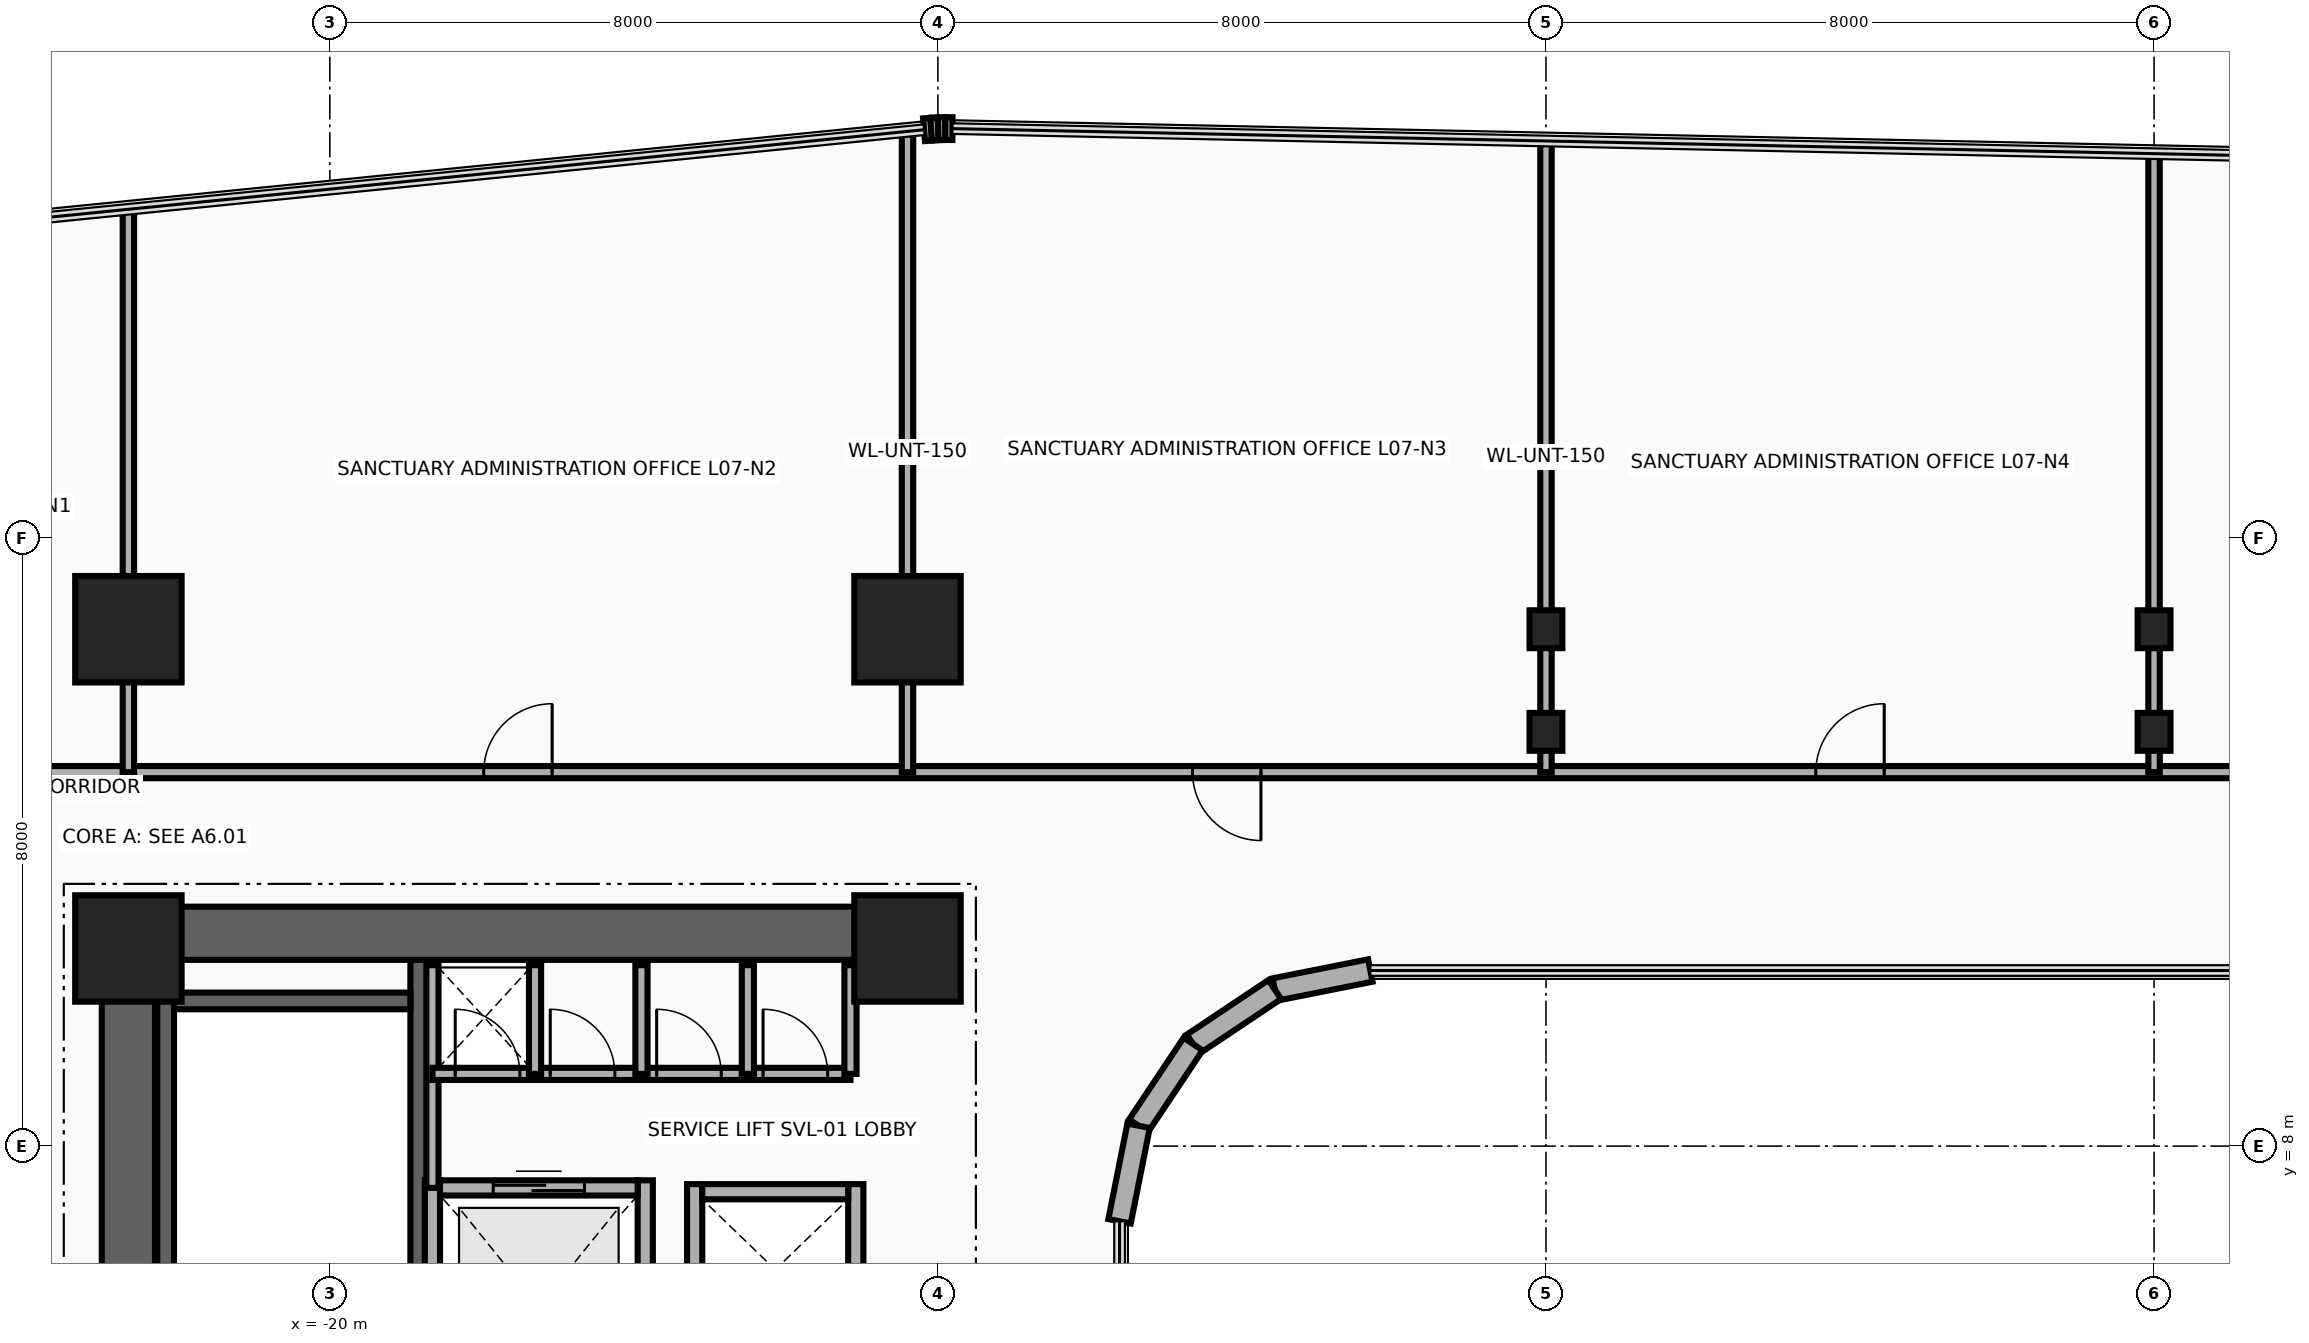
"""IFC4 building model, lengths in metres.
Left out: names, types, materials, properties, quantities, classifications, styles, units other than length and angle.
Written with IfcOpenShell. Run it as: python <this file> out.ifc"""

import sys

from ifc_helpers import new_model, si_unit, direction, frame, frame_2d, origin, origin_2d, place, context, subcontext, project, spatial, rectangle, i_section, extrude, source, transform, mapped, element, fill, save


model = new_model("IFC4")
c1 = context("Model", 3, precision=1e-05, world=origin(), true_north=direction((0.0, 1.0)))
c2 = subcontext(c1, "Body", "Model", "MODEL_VIEW")
j1 = project(units=[si_unit("LENGTHUNIT", "METRE"), si_unit("PLANEANGLEUNIT", "RADIAN")], contexts=[c1])
p1 = place(None, origin())
s1 = spatial("IfcSite", under=j1, at=p1, CompositionType="ELEMENT")
p2 = place(p1, origin())
s2 = spatial("IfcBuilding", under=s1, at=p2, CompositionType="ELEMENT")
p3 = place(p2, frame((0.0, 0.0, 33.4)))
s3 = spatial("IfcBuildingStorey", under=s2, at=p3, CompositionType="ELEMENT", Elevation=33.4)
for number, where, z_axis, x_axis in (
    (1, (-22.16, 1.78, 0.0), (0.0, 0.0, 1.0), (0.0, 1.0, 0.0)),
    (2, (-18.83, 1.78, 0.0), (0.0, 0.0, 1.0), (0.0, 1.0, 0.0)),
):
    element("IfcWall", number, at=place(p3, frame(where, z_axis=z_axis, x_axis=x_axis)), inside=s3, PredefinedType="SHEAR", context=c2, shape_type="SweptSolid", body=[
        extrude(rectangle(XDim=8.67, YDim=0.22, at=frame_2d((4.335, 0.0))), origin(), (0.0, 0.0, 1.0), 3.46),
    ])
p4 = place(p3, frame((-22.05, 9.91, 0.0), z_axis=(0.0, 0.0, 1.0), x_axis=(1.0, 0.0, 0.0)))
e3 = element("IfcWall", 3, at=p4, inside=s3, PredefinedType="SHEAR", context=c2, shape_type="SweptSolid", body=[
    extrude(rectangle(XDim=3.11, YDim=0.22, at=frame_2d((1.555, 0.0))), origin(), (0.0, 0.0, 1.0), 3.46),
])
p5 = place(p3, frame((-22.65, -11.15, 0.0), z_axis=(0.0, 0.0, 1.0), x_axis=(0.0, 1.0, 0.0)))
e4 = element("IfcWall", 4, at=p5, inside=s3, PredefinedType="SHEAR", context=c2, shape_type="SweptSolid", body=[
    extrude(rectangle(XDim=22.3, YDim=0.7, at=frame_2d((11.15, 0.0))), origin(), (0.0, 0.0, 1.0), 3.46),
])
p6 = place(p3, frame((-22.65, 10.8, 0.0), z_axis=(0.0, 0.0, 1.0), x_axis=(1.0, 0.0, 0.0)))
e5 = element("IfcWall", 5, at=p6, inside=s3, PredefinedType="SHEAR", context=c2, shape_type="SweptSolid", body=[
    extrude(rectangle(XDim=10.25, YDim=0.7, at=frame_2d((5.125, 0.0))), origin(), (0.0, 0.0, 1.0), 3.46),
])
m1 = source(origin(), c2, "Body", "SweptSolid", [
    extrude(rectangle(XDim=1.4, YDim=1.4, at=origin_2d()), origin(), (0.0, 0.0, 1.0), 3.7),
])
for number, where, z_axis, x_axis in (
    (6, (-22.65, 10.6, 0.0), (0.0, 0.0, 1.0), (1.0, 0.0, 0.0)),
    (7, (-12.4, 10.6, 0.0), (0.0, 0.0, 1.0), (1.0, 0.0, 0.0)),
    (8, (-22.65, 14.8, 0.0), (0.0, 0.0, 1.0), (1.0, 0.0, 0.0)),
    (9, (-12.4, 14.8, 0.0), (0.0, 0.0, 1.0), (1.0, 0.0, 0.0)),
):
    element("IfcColumn", number, at=place(p3, frame(where, z_axis=z_axis, x_axis=x_axis)), inside=s3, PredefinedType="COLUMN", context=c2, shape_type="MappedRepresentation", body=[
        mapped(m1, transform((0.0, 0.0, 0.0), x_axis=(1.0, 0.0, 0.0), y_axis=(0.0, 1.0, 0.0), z_axis=(0.0, 0.0, 1.0), scale=1.0)),
    ])
m2 = source(origin(), c2, "Body", "SweptSolid", [
    extrude(i_section(OverallWidth=0.432, OverallDepth=0.498, WebThickness=0.056, FlangeThickness=0.089, at=origin_2d()), origin(), (0.0, 0.0, 1.0), 3.7),
])
for number, where, z_axis, x_axis in (
    (10, (-4.0, 13.45, 0.0), (0.0, 0.0, 1.0), (1.0, 0.0, 0.0)),
    (11, (-4.0, 14.8, 0.0), (0.0, 0.0, 1.0), (1.0, 0.0, 0.0)),
    (12, (4.0, 13.45, 0.0), (0.0, 0.0, 1.0), (1.0, 0.0, 0.0)),
    (13, (4.0, 14.8, 0.0), (0.0, 0.0, 1.0), (1.0, 0.0, 0.0)),
):
    element("IfcColumn", number, at=place(p3, frame(where, z_axis=z_axis, x_axis=x_axis)), inside=s3, PredefinedType="COLUMN", context=c2, shape_type="MappedRepresentation", body=[
        mapped(m2, transform((0.0, 0.0, 0.0), x_axis=(1.0, 0.0, 0.0), y_axis=(0.0, 1.0, 0.0), z_axis=(0.0, 0.0, 1.0), scale=1.0)),
    ])
p7 = place(p3, frame((-12.182, 21.371, 0.0), z_axis=(0.0, 0.0, 1.0), x_axis=(0.996527790842, 0.08326080759, 0.0)))
e14 = element("IfcWall", 14, at=p7, inside=s3, PredefinedType="SOLIDWALL", context=c2, shape_type="SweptSolid", body=[
    extrude(rectangle(XDim=0.094, YDim=0.3, at=frame_2d((0.047, 0.0))), origin(), (0.0, 0.0, 1.0), 3.46),
])
p8 = place(p3, frame((-12.088, 21.379, 0.0), z_axis=(0.0, 0.0, 1.0), x_axis=(0.998476480444, 0.055178963393, 0.0)))
e15 = element("IfcWall", 15, at=p8, inside=s3, PredefinedType="SOLIDWALL", context=c2, shape_type="SweptSolid", body=[
    extrude(rectangle(XDim=0.093, YDim=0.3, at=frame_2d((0.046, 0.0))), origin(), (0.0, 0.0, 1.0), 3.46),
])
p9 = place(p3, frame((-11.996, 21.384, 0.0), z_axis=(0.0, 0.0, 1.0), x_axis=(0.999722573757, 0.023553673204, 0.0)))
e16 = element("IfcWall", 16, at=p9, inside=s3, PredefinedType="SOLIDWALL", context=c2, shape_type="SweptSolid", body=[
    extrude(rectangle(XDim=0.093, YDim=0.3, at=frame_2d((0.047, 0.0))), origin(), (0.0, 0.0, 1.0), 3.46),
])
p10 = place(p3, frame((-11.902, 21.386, 0.0), z_axis=(0.0, 0.0, 1.0), x_axis=(0.999986507273, -0.005194735103, 0.0)))
e17 = element("IfcWall", 17, at=p10, inside=s3, PredefinedType="SOLIDWALL", context=c2, shape_type="SweptSolid", body=[
    extrude(rectangle(XDim=0.094, YDim=0.3, at=frame_2d((0.047, 0.0))), origin(), (0.0, 0.0, 1.0), 3.46),
])
p11 = place(p3, frame((-6.311, 10.31, 0.0), z_axis=(0.0, 0.0, 1.0), x_axis=(-0.980778058848, -0.195126623715, 0.0)))
e18 = element("IfcWall", 18, at=p11, inside=s3, PredefinedType="SOLIDWALL", context=c2, shape_type="SweptSolid", body=[
    extrude(rectangle(XDim=1.281, YDim=0.3, at=frame_2d((0.641, 0.0))), origin(), (0.0, 0.0, 1.0), 3.46),
])
p12 = place(p3, frame((-7.567, 10.06, 0.0), z_axis=(0.0, 0.0, 1.0), x_axis=(-0.831497739511, -0.555528135371, 0.0)))
e19 = element("IfcWall", 19, at=p12, inside=s3, PredefinedType="SOLIDWALL", context=c2, shape_type="SweptSolid", body=[
    extrude(rectangle(XDim=1.292, YDim=0.3, at=frame_2d((0.646, 0.0))), origin(), (0.0, 0.0, 1.0), 3.46),
])
p13 = place(p3, frame((-8.642, 9.342, 0.0), z_axis=(0.0, 0.0, 1.0), x_axis=(-0.555615398575, -0.831439431869, 0.0)))
e20 = element("IfcWall", 20, at=p13, inside=s3, PredefinedType="SOLIDWALL", context=c2, shape_type="SweptSolid", body=[
    extrude(rectangle(XDim=1.292, YDim=0.3, at=frame_2d((0.646, 0.0))), origin(), (0.0, 0.0, 1.0), 3.46),
])
p14 = place(p3, frame((-9.36, 8.268, 0.0), z_axis=(0.0, 0.0, 1.0), x_axis=(-0.195090163074, -0.980785312019, 0.0)))
e21 = element("IfcWall", 21, at=p14, inside=s3, PredefinedType="SOLIDWALL", context=c2, shape_type="SweptSolid", body=[
    extrude(rectangle(XDim=1.281, YDim=0.3, at=frame_2d((0.641, 0.0))), origin(), (0.0, 0.0, 1.0), 3.46),
])
for number, where, z_axis, x_axis in (
    (22, (-18.65, 4.225, 0.0), (0.0, 0.0, 1.0), (0.0, 1.0, 0.0)),
    (23, (-15.85, 4.225, 0.0), (0.0, 0.0, 1.0), (0.0, 1.0, 0.0)),
):
    element("IfcWall", number, at=place(p3, frame(where, z_axis=z_axis, x_axis=x_axis)), inside=s3, PredefinedType="MOVABLE", context=c2, shape_type="SweptSolid", body=[
        extrude(rectangle(XDim=3.325, YDim=0.2, at=frame_2d((1.663, 0.0))), origin(), (0.0, 0.0, 1.0), 3.46),
    ])
p15 = place(p3, frame((-18.55, 7.45, 0.0), z_axis=(0.0, 0.0, 1.0), x_axis=(1.0, 0.0, 0.0)))
e24 = element("IfcWall", 24, at=p15, inside=s3, PredefinedType="MOVABLE", context=c2, shape_type="SweptSolid", body=[
    extrude(rectangle(XDim=2.6, YDim=0.2, at=frame_2d((1.3, 0.0))), origin(), (0.0, 0.0, 1.0), 3.46),
])
p16 = place(p15, frame((0.7, 0.0, 0.0)))
e25 = element("IfcOpeningElement", 25, at=p16, cuts=e24, PredefinedType="OPENING", context=c2, shape_type="SweptSolid", body=[
    extrude(rectangle(XDim=1.2, YDim=2.1, at=frame_2d((0.6, 1.05))), frame((0.0, 0.115, 0.0), z_axis=(0.0, -1.0, 0.0), x_axis=(1.0, 0.0, 0.0)), (0.0, 0.0, 1.0), 0.23),
])
for number, where, z_axis, x_axis in (
    (26, (-15.2, 5.25, 0.0), (0.0, 0.0, 1.0), (0.0, 1.0, 0.0)),
    (27, (-13.08, 5.25, 0.0), (0.0, 0.0, 1.0), (0.0, 1.0, 0.0)),
):
    element("IfcWall", number, at=place(p3, frame(where, z_axis=z_axis, x_axis=x_axis)), inside=s3, PredefinedType="MOVABLE", context=c2, shape_type="SweptSolid", body=[
        extrude(rectangle(XDim=2.25, YDim=0.2, at=frame_2d((1.125, 0.0))), origin(), (0.0, 0.0, 1.0), 3.46),
    ])
p17 = place(p3, frame((-15.1, 7.4, 0.0), z_axis=(0.0, 0.0, 1.0), x_axis=(1.0, 0.0, 0.0)))
e28 = element("IfcWall", 28, at=p17, inside=s3, PredefinedType="MOVABLE", context=c2, shape_type="SweptSolid", body=[
    extrude(rectangle(XDim=1.92, YDim=0.2, at=frame_2d((0.96, 0.0))), origin(), (0.0, 0.0, 1.0), 3.46),
])
p18 = place(p3, frame((-18.65, 7.45, 0.0), z_axis=(0.0, 0.0, 1.0), x_axis=(0.0, 1.0, 0.0)))
e29 = element("IfcWall", 29, at=p18, inside=s3, PredefinedType="PARTITIONING", context=c2, shape_type="SweptSolid", body=[
    extrude(rectangle(XDim=2.93, YDim=0.16, at=frame_2d((1.465, 0.0))), origin(), (0.0, 0.0, 1.0), 3.46),
])
p19 = place(p3, frame((-18.65, 8.95, 0.0), z_axis=(0.0, 0.0, 1.0), x_axis=(1.0, 0.0, 0.0)))
e30 = element("IfcWall", 30, at=p19, inside=s3, PredefinedType="PARTITIONING", context=c2, shape_type="SweptSolid", body=[
    extrude(rectangle(XDim=5.5, YDim=0.16, at=frame_2d((2.75, 0.0))), origin(), (0.0, 0.0, 1.0), 3.46),
])
p20 = place(p19, frame((0.3, 0.0, 0.0)))
e31 = element("IfcOpeningElement", 31, at=p20, cuts=e30, PredefinedType="OPENING", context=c2, shape_type="SweptSolid", body=[
    extrude(rectangle(XDim=0.85, YDim=2.05, at=frame_2d((0.425, 1.025))), frame((0.0, 0.095, 0.0), z_axis=(0.0, -1.0, 0.0), x_axis=(1.0, 0.0, 0.0)), (0.0, 0.0, 1.0), 0.19),
])
p21 = place(p19, frame((1.55, 0.0, 0.0)))
e32 = element("IfcOpeningElement", 32, at=p21, cuts=e30, PredefinedType="OPENING", context=c2, shape_type="SweptSolid", body=[
    extrude(rectangle(XDim=0.85, YDim=2.05, at=frame_2d((0.425, 1.025))), frame((0.0, 0.095, 0.0), z_axis=(0.0, -1.0, 0.0), x_axis=(1.0, 0.0, 0.0)), (0.0, 0.0, 1.0), 0.19),
])
p22 = place(p19, frame((2.95, 0.0, 0.0)))
e33 = element("IfcOpeningElement", 33, at=p22, cuts=e30, PredefinedType="OPENING", context=c2, shape_type="SweptSolid", body=[
    extrude(rectangle(XDim=0.85, YDim=2.05, at=frame_2d((0.425, 1.025))), frame((0.0, 0.095, 0.0), z_axis=(0.0, -1.0, 0.0), x_axis=(1.0, 0.0, 0.0)), (0.0, 0.0, 1.0), 0.19),
])
p23 = place(p19, frame((4.35, 0.0, 0.0)))
e34 = element("IfcOpeningElement", 34, at=p23, cuts=e30, PredefinedType="OPENING", context=c2, shape_type="SweptSolid", body=[
    extrude(rectangle(XDim=0.85, YDim=2.05, at=frame_2d((0.425, 1.025))), frame((0.0, 0.095, 0.0), z_axis=(0.0, -1.0, 0.0), x_axis=(1.0, 0.0, 0.0)), (0.0, 0.0, 1.0), 0.19),
])
for number, where, z_axis, x_axis in (
    (35, (-13.15, 8.95, 0.0), (0.0, 0.0, 1.0), (0.0, 1.0, 0.0)),
    (36, (-17.3, 8.95, 0.0), (0.0, 0.0, 1.0), (0.0, 1.0, 0.0)),
    (37, (-15.9, 8.95, 0.0), (0.0, 0.0, 1.0), (0.0, 1.0, 0.0)),
    (38, (-14.5, 8.95, 0.0), (0.0, 0.0, 1.0), (0.0, 1.0, 0.0)),
):
    element("IfcWall", number, at=place(p3, frame(where, z_axis=z_axis, x_axis=x_axis)), inside=s3, PredefinedType="PARTITIONING", context=c2, shape_type="SweptSolid", body=[
        extrude(rectangle(XDim=1.43, YDim=0.16, at=frame_2d((0.715, 0.0))), origin(), (0.0, 0.0, 1.0), 3.46),
    ])
p24 = place(p3, frame((-31.89, 12.92, 0.0), z_axis=(0.0, 0.0, 1.0), x_axis=(1.0, 0.0, 0.0)))
e39 = element("IfcWall", 39, at=p24, inside=s3, PredefinedType="PARTITIONING", context=c2, shape_type="SweptSolid", body=[
    extrude(rectangle(XDim=45.44, YDim=0.16, at=frame_2d((22.72, 0.0))), origin(), (0.0, 0.0, 1.0), 2.583),
])
p25 = place(p24, frame((4.17, 0.0, 0.0)))
e40 = element("IfcOpeningElement", 40, at=p25, cuts=e39, PredefinedType="OPENING", context=c2, shape_type="SweptSolid", body=[
    extrude(rectangle(XDim=0.9, YDim=2.1, at=frame_2d((0.45, 1.05))), frame((0.0, 0.095, 0.0), z_axis=(0.0, -1.0, 0.0), x_axis=(1.0, 0.0, 0.0)), (0.0, 0.0, 1.0), 0.19),
])
p26 = place(p24, frame((13.915, 0.0, 0.0)))
e41 = element("IfcOpeningElement", 41, at=p26, cuts=e39, PredefinedType="OPENING", context=c2, shape_type="SweptSolid", body=[
    extrude(rectangle(XDim=0.9, YDim=2.1, at=frame_2d((0.45, 1.05))), frame((0.0, 0.095, 0.0), z_axis=(0.0, -1.0, 0.0), x_axis=(1.0, 0.0, 0.0)), (0.0, 0.0, 1.0), 0.19),
])
p27 = place(p24, frame((23.24, 0.0, 0.0)))
e42 = element("IfcOpeningElement", 42, at=p27, cuts=e39, PredefinedType="OPENING", context=c2, shape_type="SweptSolid", body=[
    extrude(rectangle(XDim=0.9, YDim=2.1, at=frame_2d((0.45, 1.05))), frame((0.0, 0.095, 0.0), z_axis=(0.0, -1.0, 0.0), x_axis=(1.0, 0.0, 0.0)), (0.0, 0.0, 1.0), 0.19),
])
p28 = place(p24, frame((31.44, 0.0, 0.0)))
e43 = element("IfcOpeningElement", 43, at=p28, cuts=e39, PredefinedType="OPENING", context=c2, shape_type="SweptSolid", body=[
    extrude(rectangle(XDim=0.9, YDim=2.1, at=frame_2d((0.45, 1.05))), frame((0.0, 0.095, 0.0), z_axis=(0.0, -1.0, 0.0), x_axis=(1.0, 0.0, 0.0)), (0.0, 0.0, 1.0), 0.19),
])
p29 = place(p24, frame((40.215, 0.0, 0.0)))
e44 = element("IfcOpeningElement", 44, at=p29, cuts=e39, PredefinedType="OPENING", context=c2, shape_type="SweptSolid", body=[
    extrude(rectangle(XDim=0.9, YDim=2.1, at=frame_2d((0.45, 1.05))), frame((0.0, 0.095, 0.0), z_axis=(0.0, -1.0, 0.0), x_axis=(1.0, 0.0, 0.0)), (0.0, 0.0, 1.0), 0.19),
])
p30 = place(p3, frame((-22.65, 12.92, 0.0), z_axis=(0.0, 0.0, 1.0), x_axis=(0.0, 1.0, 0.0)))
e45 = element("IfcWall", 45, at=p30, inside=s3, PredefinedType="PARTITIONING", context=c2, shape_type="SweptSolid", body=[
    extrude(rectangle(XDim=7.405, YDim=0.15, at=frame_2d((3.702, 0.0))), origin(), (0.0, 0.0, 1.0), 2.583),
])
p31 = place(p3, frame((-12.4, 12.92, 0.0), z_axis=(0.0, 0.0, 1.0), x_axis=(0.0, 1.0, 0.0)))
e46 = element("IfcWall", 46, at=p31, inside=s3, PredefinedType="PARTITIONING", context=c2, shape_type="SweptSolid", body=[
    extrude(rectangle(XDim=8.43, YDim=0.15, at=frame_2d((4.215, 0.0))), origin(), (0.0, 0.0, 1.0), 2.583),
])
p32 = place(p3, frame((-4.0, 12.92, 0.0), z_axis=(0.0, 0.0, 1.0), x_axis=(0.0, 1.0, 0.0)))
e47 = element("IfcWall", 47, at=p32, inside=s3, PredefinedType="PARTITIONING", context=c2, shape_type="SweptSolid", body=[
    extrude(rectangle(XDim=8.303, YDim=0.15, at=frame_2d((4.152, 0.0))), origin(), (0.0, 0.0, 1.0), 2.583),
])
p33 = place(p3, frame((4.0, 12.92, 0.0), z_axis=(0.0, 0.0, 1.0), x_axis=(0.0, 1.0, 0.0)))
e48 = element("IfcWall", 48, at=p33, inside=s3, PredefinedType="PARTITIONING", context=c2, shape_type="SweptSolid", body=[
    extrude(rectangle(XDim=8.137, YDim=0.15, at=frame_2d((4.068, 0.0))), origin(), (0.0, 0.0, 1.0), 2.583),
])
p34 = place(p16, origin())
e49 = element("IfcDoor", 49, at=p34, inside=s3, OperationType="DOUBLE_DOOR_SLIDING", PredefinedType="DOOR", context=c2, shape_type="SweptSolid", body=[
    extrude(rectangle(XDim=1.2, YDim=2.1, at=frame_2d((0.6, 1.05))), frame((0.0, 0.025, 0.0), z_axis=(0.0, -1.0, 0.0), x_axis=(1.0, 0.0, 0.0)), (0.0, 0.0, 1.0), 0.05),
])
fill(e25, e49)
p35 = place(p20, origin())
e50 = element("IfcDoor", 50, at=p35, inside=s3, OperationType="SINGLE_SWING_LEFT", PredefinedType="DOOR", context=c2, shape_type="SweptSolid", body=[
    extrude(rectangle(XDim=0.85, YDim=2.05, at=frame_2d((0.425, 1.025))), frame((0.0, 0.025, 0.0), z_axis=(0.0, -1.0, 0.0), x_axis=(1.0, 0.0, 0.0)), (0.0, 0.0, 1.0), 0.05),
])
fill(e31, e50)
p36 = place(p21, origin())
e51 = element("IfcDoor", 51, at=p36, inside=s3, OperationType="SINGLE_SWING_RIGHT", PredefinedType="DOOR", context=c2, shape_type="SweptSolid", body=[
    extrude(rectangle(XDim=0.85, YDim=2.05, at=frame_2d((0.425, 1.025))), frame((0.0, 0.025, 0.0), z_axis=(0.0, -1.0, 0.0), x_axis=(1.0, 0.0, 0.0)), (0.0, 0.0, 1.0), 0.05),
])
fill(e32, e51)
p37 = place(p22, origin())
e52 = element("IfcDoor", 52, at=p37, inside=s3, OperationType="SINGLE_SWING_LEFT", PredefinedType="DOOR", context=c2, shape_type="SweptSolid", body=[
    extrude(rectangle(XDim=0.85, YDim=2.05, at=frame_2d((0.425, 1.025))), frame((0.0, 0.025, 0.0), z_axis=(0.0, -1.0, 0.0), x_axis=(1.0, 0.0, 0.0)), (0.0, 0.0, 1.0), 0.05),
])
fill(e33, e52)
p38 = place(p23, origin())
e53 = element("IfcDoor", 53, at=p38, inside=s3, OperationType="SINGLE_SWING_RIGHT", PredefinedType="DOOR", context=c2, shape_type="SweptSolid", body=[
    extrude(rectangle(XDim=0.85, YDim=2.05, at=frame_2d((0.425, 1.025))), frame((0.0, 0.025, 0.0), z_axis=(0.0, -1.0, 0.0), x_axis=(1.0, 0.0, 0.0)), (0.0, 0.0, 1.0), 0.05),
])
fill(e34, e53)
p39 = place(p26, origin())
e54 = element("IfcDoor", 54, at=p39, inside=s3, OperationType="SINGLE_SWING_RIGHT", PredefinedType="DOOR", context=c2, shape_type="SweptSolid", body=[
    extrude(rectangle(XDim=0.9, YDim=2.1, at=frame_2d((0.45, 1.05))), frame((0.0, 0.025, 0.0), z_axis=(0.0, -1.0, 0.0), x_axis=(1.0, 0.0, 0.0)), (0.0, 0.0, 1.0), 0.05),
])
fill(e41, e54)
p40 = place(p27, frame((0.9, 0.0, 0.0), z_axis=(0.0, 0.0, 1.0), x_axis=(-1.0, 0.0, 0.0)))
e55 = element("IfcDoor", 55, at=p40, inside=s3, OperationType="SINGLE_SWING_LEFT", PredefinedType="DOOR", context=c2, shape_type="SweptSolid", body=[
    extrude(rectangle(XDim=0.9, YDim=2.1, at=frame_2d((0.45, 1.05))), frame((0.0, 0.025, 0.0), z_axis=(0.0, -1.0, 0.0), x_axis=(1.0, 0.0, 0.0)), (0.0, 0.0, 1.0), 0.05),
])
fill(e42, e55)
p41 = place(p28, origin())
e56 = element("IfcDoor", 56, at=p41, inside=s3, OperationType="SINGLE_SWING_RIGHT", PredefinedType="DOOR", context=c2, shape_type="SweptSolid", body=[
    extrude(rectangle(XDim=0.9, YDim=2.1, at=frame_2d((0.45, 1.05))), frame((0.0, 0.025, 0.0), z_axis=(0.0, -1.0, 0.0), x_axis=(1.0, 0.0, 0.0)), (0.0, 0.0, 1.0), 0.05),
])
fill(e43, e56)
save(model, sys.argv[1])
